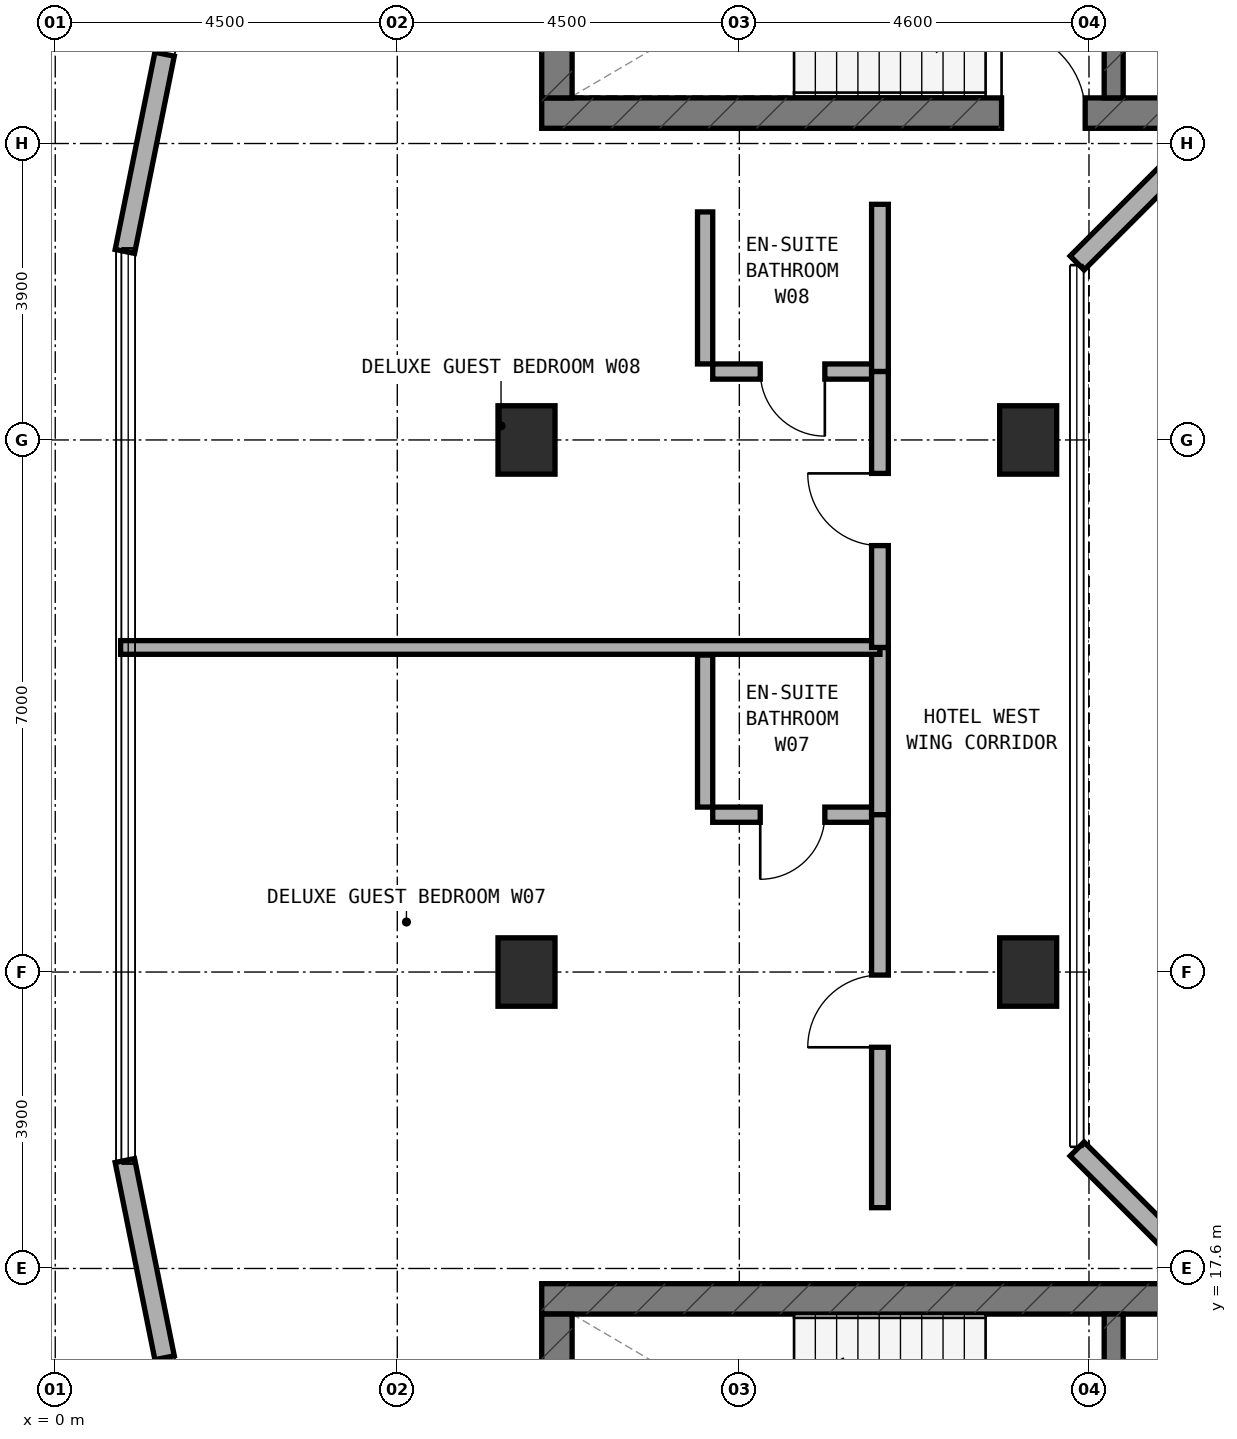
"""IFC4 building model, lengths in metres.
Left out: names, types, materials, properties, quantities, classifications, styles, units other than length and angle.
Written with IfcOpenShell. Run it as: python <this file> out.ifc"""

import sys

from ifc_helpers import new_model, si_unit, direction, frame, frame_2d, origin, origin_2d, place, context, subcontext, project, spatial, rectangle, extrude, element, fill, save


model = new_model("IFC4")
c1 = context("Model", 3, precision=1e-05, world=origin(), true_north=direction((0.0, 1.0)))
c2 = subcontext(c1, "Body", "Model", "MODEL_VIEW")
j1 = project(units=[si_unit("LENGTHUNIT", "METRE"), si_unit("PLANEANGLEUNIT", "RADIAN")], contexts=[c1])
p1 = place(None, origin())
s1 = spatial("IfcSite", under=j1, at=p1, CompositionType="ELEMENT")
p2 = place(p1, origin())
s2 = spatial("IfcBuilding", under=s1, at=p2, CompositionType="ELEMENT")
p3 = place(p2, frame((0.0, 0.0, 138.0)))
s3 = spatial("IfcBuildingStorey", under=s2, at=p3, CompositionType="ELEMENT", Elevation=138.0)
p4 = place(p3, frame((6.4, 32.8, 0.0), z_axis=(0.0, 0.0, 1.0), x_axis=(1.0, 0.0, 0.0)))
e1 = element("IfcWall", 1, at=p4, inside=s3, PredefinedType="SHEAR", context=c2, shape_type="SweptSolid", body=[
    extrude(rectangle(XDim=24.4, YDim=0.4, at=frame_2d((12.2, 0.0))), origin(), (0.0, 0.0, 1.0), 3.5),
])
p5 = place(p4, frame((6.05, 0.0, 0.0)))
e2 = element("IfcOpeningElement", 2, at=p5, cuts=e1, PredefinedType="OPENING", context=c2, shape_type="SweptSolid", body=[
    extrude(rectangle(XDim=1.1, YDim=2.15, at=frame_2d((0.55, 1.075))), frame((0.0, 0.21, 0.0), z_axis=(0.0, -1.0, 0.0), x_axis=(1.0, 0.0, 0.0)), (0.0, 0.0, 1.0), 0.42),
])
p6 = place(p3, frame((6.6, 33.0, 0.0), z_axis=(0.0, 0.0, 1.0), x_axis=(0.0, 1.0, 0.0)))
e3 = element("IfcWall", 3, at=p6, inside=s3, PredefinedType="SHEAR", context=c2, shape_type="SweptSolid", body=[
    extrude(rectangle(XDim=3.16, YDim=0.4, at=frame_2d((1.58, 0.0))), origin(), (0.0, 0.0, 1.0), 3.5),
])
p7 = place(p3, frame((13.925, 33.0, 0.0), z_axis=(0.0, 0.0, 1.0), x_axis=(0.0, 1.0, 0.0)))
e4 = element("IfcWall", 4, at=p7, inside=s3, PredefinedType="STANDARD", context=c2, shape_type="SweptSolid", body=[
    extrude(rectangle(XDim=3.16, YDim=0.25, at=frame_2d((1.58, 0.0))), origin(), (0.0, 0.0, 1.0), 3.22),
])
p8 = place(p7, frame((0.98, 0.0, 0.0)))
e5 = element("IfcOpeningElement", 5, at=p8, cuts=e4, PredefinedType="OPENING", context=c2, shape_type="SweptSolid", body=[
    extrude(rectangle(XDim=1.1, YDim=2.15, at=frame_2d((0.55, 1.075))), frame((0.0, 0.135, 0.0), z_axis=(0.0, -1.0, 0.0), x_axis=(1.0, 0.0, 0.0)), (0.0, 0.0, 1.0), 0.27),
])
p9 = place(p3, frame((6.4, 17.2, 0.0), z_axis=(0.0, 0.0, 1.0), x_axis=(1.0, 0.0, 0.0)))
e6 = element("IfcWall", 6, at=p9, inside=s3, PredefinedType="SHEAR", context=c2, shape_type="SweptSolid", body=[
    extrude(rectangle(XDim=24.4, YDim=0.4, at=frame_2d((12.2, 0.0))), origin(), (0.0, 0.0, 1.0), 3.5),
])
p10 = place(p3, frame((6.6, 13.84, 0.0), z_axis=(0.0, 0.0, 1.0), x_axis=(0.0, 1.0, 0.0)))
e7 = element("IfcWall", 7, at=p10, inside=s3, PredefinedType="SHEAR", context=c2, shape_type="SweptSolid", body=[
    extrude(rectangle(XDim=3.16, YDim=0.4, at=frame_2d((1.58, 0.0))), origin(), (0.0, 0.0, 1.0), 3.5),
])
p11 = place(p3, frame((13.925, 13.84, 0.0), z_axis=(0.0, 0.0, 1.0), x_axis=(0.0, 1.0, 0.0)))
e8 = element("IfcWall", 8, at=p11, inside=s3, PredefinedType="STANDARD", context=c2, shape_type="SweptSolid", body=[
    extrude(rectangle(XDim=3.16, YDim=0.25, at=frame_2d((1.58, 0.0))), origin(), (0.0, 0.0, 1.0), 3.22),
])
p12 = place(p11, frame((0.98, 0.0, 0.0)))
e9 = element("IfcOpeningElement", 9, at=p12, cuts=e8, PredefinedType="OPENING", context=c2, shape_type="SweptSolid", body=[
    extrude(rectangle(XDim=1.1, YDim=2.15, at=frame_2d((0.55, 1.075))), frame((0.0, 0.135, 0.0), z_axis=(0.0, -1.0, 0.0), x_axis=(1.0, 0.0, 0.0)), (0.0, 0.0, 1.0), 0.27),
])
for number, where, z_axis, x_axis in (
    (10, (6.2, 21.5, 0.0), (0.0, 0.0, 1.0), (1.0, 0.0, 0.0)),
    (11, (6.2, 28.5, 0.0), (0.0, 0.0, 1.0), (1.0, 0.0, 0.0)),
    (12, (12.8, 21.5, 0.0), (0.0, 0.0, 1.0), (1.0, 0.0, 0.0)),
    (13, (12.8, 28.5, 0.0), (0.0, 0.0, 1.0), (1.0, 0.0, 0.0)),
):
    element("IfcColumn", number, at=place(p3, frame(where, z_axis=z_axis, x_axis=x_axis)), inside=s3, PredefinedType="COLUMN", context=c2, shape_type="SweptSolid", body=[
        extrude(rectangle(XDim=0.75, YDim=0.9, at=origin_2d()), origin(), (0.0, 0.0, 1.0), 3.5),
    ])
p13 = place(p3, frame((2.729, 39.982, 0.0), z_axis=(0.0, 0.0, 1.0), x_axis=(-0.197435082048, -0.980315963543, 0.0)))
e14 = element("IfcWall", 14, at=p13, inside=s3, PredefinedType="STANDARD", context=c2, shape_type="SweptSolid", body=[
    extrude(rectangle(XDim=9.183, YDim=0.26, at=frame_2d((4.591, 0.0))), origin(), (0.0, 0.0, 1.0), 3.22),
])
p14 = place(p13, frame((4.436, 0.0, 0.85)))
e15 = element("IfcOpeningElement", 15, at=p14, cuts=e14, PredefinedType="OPENING", context=c2, shape_type="SweptSolid", body=[
    extrude(rectangle(XDim=2.1, YDim=1.5, at=frame_2d((1.05, 0.75))), frame((0.0, 0.14, 0.0), z_axis=(0.0, -1.0, 0.0), x_axis=(1.0, 0.0, 0.0)), (0.0, 0.0, 1.0), 0.28),
])
p15 = place(p3, frame((0.916, 19.02, 0.0), z_axis=(0.0, 0.0, 1.0), x_axis=(0.197435082048, -0.980315963543, 0.0)))
e16 = element("IfcWall", 16, at=p15, inside=s3, PredefinedType="STANDARD", context=c2, shape_type="SweptSolid", body=[
    extrude(rectangle(XDim=9.183, YDim=0.26, at=frame_2d((4.591, 0.0))), origin(), (0.0, 0.0, 1.0), 3.22),
])
p16 = place(p15, frame((2.647, 0.0, 0.85)))
e17 = element("IfcOpeningElement", 17, at=p16, cuts=e16, PredefinedType="OPENING", context=c2, shape_type="SweptSolid", body=[
    extrude(rectangle(XDim=2.1, YDim=1.5, at=frame_2d((1.05, 0.75))), frame((0.0, 0.14, 0.0), z_axis=(0.0, -1.0, 0.0), x_axis=(1.0, 0.0, 0.0)), (0.0, 0.0, 1.0), 0.28),
])
for number, where, z_axis, x_axis in (
    (18, (15.278, 32.662, 0.0), (0.0, 0.0, 1.0), (-0.707, -0.707, 0.0)),
    (19, (13.444, 19.172, 0.0), (0.0, 0.0, 1.0), (0.707, -0.707, 0.0)),
):
    element("IfcWall", number, at=place(p3, frame(where, z_axis=z_axis, x_axis=x_axis)), inside=s3, PredefinedType="STANDARD", context=c2, shape_type="SweptSolid", body=[
        extrude(rectangle(XDim=2.594, YDim=0.26, at=frame_2d((1.297, 0.0))), origin(), (0.0, 0.0, 1.0), 3.22),
    ])
p17 = place(p3, frame((8.65, 23.57, 0.0), z_axis=(0.0, 0.0, 1.0), x_axis=(1.0, 0.0, 0.0)))
e20 = element("IfcWall", 20, at=p17, inside=s3, PredefinedType="PLUMBINGWALL", context=c2, shape_type="SweptSolid", body=[
    extrude(rectangle(XDim=2.1, YDim=0.2, at=frame_2d((1.05, 0.0))), origin(), (0.0, 0.0, 1.0), 3.22),
])
p18 = place(p17, frame((0.625, 0.0, 0.0)))
e21 = element("IfcOpeningElement", 21, at=p18, cuts=e20, PredefinedType="OPENING", context=c2, shape_type="SweptSolid", body=[
    extrude(rectangle(XDim=0.85, YDim=2.1, at=frame_2d((0.425, 1.05))), frame((0.0, 0.11, 0.0), z_axis=(0.0, -1.0, 0.0), x_axis=(1.0, 0.0, 0.0)), (0.0, 0.0, 1.0), 0.22),
])
p19 = place(p3, frame((8.55, 23.67, 0.0), z_axis=(0.0, 0.0, 1.0), x_axis=(0.0, 1.0, 0.0)))
e22 = element("IfcWall", 22, at=p19, inside=s3, PredefinedType="PLUMBINGWALL", context=c2, shape_type="SweptSolid", body=[
    extrude(rectangle(XDim=2.0, YDim=0.2, at=frame_2d((1.0, 0.0))), origin(), (0.0, 0.0, 1.0), 3.22),
])
p20 = place(p3, frame((10.85, 23.57, 0.0), z_axis=(0.0, 0.0, 1.0), x_axis=(0.0, 1.0, 0.0)))
e23 = element("IfcWall", 23, at=p20, inside=s3, PredefinedType="SOLIDWALL", context=c2, shape_type="SweptSolid", body=[
    extrude(rectangle(XDim=2.2, YDim=0.22, at=frame_2d((1.1, 0.0))), origin(), (0.0, 0.0, 1.0), 3.22),
])
p21 = place(p3, frame((10.85, 18.4, 0.0), z_axis=(0.0, 0.0, 1.0), x_axis=(0.0, 1.0, 0.0)))
e24 = element("IfcWall", 24, at=p21, inside=s3, PredefinedType="SOLIDWALL", context=c2, shape_type="SweptSolid", body=[
    extrude(rectangle(XDim=5.17, YDim=0.22, at=frame_2d((2.585, 0.0))), origin(), (0.0, 0.0, 1.0), 2.695),
])
p22 = place(p21, frame((2.11, 0.0, 0.0)))
e25 = element("IfcOpeningElement", 25, at=p22, cuts=e24, PredefinedType="OPENING", context=c2, shape_type="SweptSolid", body=[
    extrude(rectangle(XDim=0.95, YDim=2.1, at=frame_2d((0.475, 1.05))), frame((0.0, 0.12, 0.0), z_axis=(0.0, -1.0, 0.0), x_axis=(1.0, 0.0, 0.0)), (0.0, 0.0, 1.0), 0.24),
])
p23 = place(p3, frame((0.86, 25.77, 0.0), z_axis=(0.0, 0.0, 1.0), x_axis=(1.0, 0.0, 0.0)))
e26 = element("IfcWall", 26, at=p23, inside=s3, PredefinedType="SOLIDWALL", context=c2, shape_type="SweptSolid", body=[
    extrude(rectangle(XDim=9.99, YDim=0.18, at=frame_2d((4.995, 0.0))), origin(), (0.0, 0.0, 1.0), 2.835),
])
p24 = place(p3, frame((8.65, 29.4, 0.0), z_axis=(0.0, 0.0, 1.0), x_axis=(1.0, 0.0, 0.0)))
e27 = element("IfcWall", 27, at=p24, inside=s3, PredefinedType="PLUMBINGWALL", context=c2, shape_type="SweptSolid", body=[
    extrude(rectangle(XDim=2.1, YDim=0.2, at=frame_2d((1.05, 0.0))), origin(), (0.0, 0.0, 1.0), 3.22),
])
p25 = place(p24, frame((0.625, 0.0, 0.0)))
e28 = element("IfcOpeningElement", 28, at=p25, cuts=e27, PredefinedType="OPENING", context=c2, shape_type="SweptSolid", body=[
    extrude(rectangle(XDim=0.85, YDim=2.1, at=frame_2d((0.425, 1.05))), frame((0.0, 0.11, 0.0), z_axis=(0.0, -1.0, 0.0), x_axis=(1.0, 0.0, 0.0)), (0.0, 0.0, 1.0), 0.22),
])
p26 = place(p3, frame((8.55, 29.5, 0.0), z_axis=(0.0, 0.0, 1.0), x_axis=(0.0, 1.0, 0.0)))
e29 = element("IfcWall", 29, at=p26, inside=s3, PredefinedType="PLUMBINGWALL", context=c2, shape_type="SweptSolid", body=[
    extrude(rectangle(XDim=2.0, YDim=0.2, at=frame_2d((1.0, 0.0))), origin(), (0.0, 0.0, 1.0), 3.22),
])
p27 = place(p3, frame((10.85, 29.4, 0.0), z_axis=(0.0, 0.0, 1.0), x_axis=(0.0, 1.0, 0.0)))
e30 = element("IfcWall", 30, at=p27, inside=s3, PredefinedType="SOLIDWALL", context=c2, shape_type="SweptSolid", body=[
    extrude(rectangle(XDim=2.2, YDim=0.22, at=frame_2d((1.1, 0.0))), origin(), (0.0, 0.0, 1.0), 3.22),
])
p28 = place(p3, frame((10.85, 25.77, 0.0), z_axis=(0.0, 0.0, 1.0), x_axis=(0.0, 1.0, 0.0)))
e31 = element("IfcWall", 31, at=p28, inside=s3, PredefinedType="SOLIDWALL", context=c2, shape_type="SweptSolid", body=[
    extrude(rectangle(XDim=3.63, YDim=0.22, at=frame_2d((1.815, 0.0))), origin(), (0.0, 0.0, 1.0), 2.695),
])
p29 = place(p28, frame((1.34, 0.0, 0.0)))
e32 = element("IfcOpeningElement", 32, at=p29, cuts=e31, PredefinedType="OPENING", context=c2, shape_type="SweptSolid", body=[
    extrude(rectangle(XDim=0.95, YDim=2.1, at=frame_2d((0.475, 1.05))), frame((0.0, 0.12, 0.0), z_axis=(0.0, -1.0, 0.0), x_axis=(1.0, 0.0, 0.0)), (0.0, 0.0, 1.0), 0.24),
])
p30 = place(p14, origin())
e33 = element("IfcWindow", 33, at=p30, inside=s3, PartitioningType="SINGLE_PANEL", PredefinedType="WINDOW", context=c2, shape_type="SweptSolid", body=[
    extrude(rectangle(XDim=2.1, YDim=1.5, at=frame_2d((1.05, 0.75))), frame((0.0, 0.03, 0.0), z_axis=(0.0, -1.0, 0.0), x_axis=(1.0, 0.0, 0.0)), (0.0, 0.0, 1.0), 0.06),
])
fill(e15, e33)
p31 = place(p16, origin())
e34 = element("IfcWindow", 34, at=p31, inside=s3, PartitioningType="SINGLE_PANEL", PredefinedType="WINDOW", context=c2, shape_type="SweptSolid", body=[
    extrude(rectangle(XDim=2.1, YDim=1.5, at=frame_2d((1.05, 0.75))), frame((0.0, 0.03, 0.0), z_axis=(0.0, -1.0, 0.0), x_axis=(1.0, 0.0, 0.0)), (0.0, 0.0, 1.0), 0.06),
])
fill(e17, e34)
p32 = place(p5, origin())
e35 = element("IfcDoor", 35, at=p32, inside=s3, OperationType="SINGLE_SWING_LEFT", PredefinedType="DOOR", context=c2, shape_type="SweptSolid", body=[
    extrude(rectangle(XDim=1.1, YDim=2.15, at=frame_2d((0.55, 1.075))), frame((0.0, 0.025, 0.0), z_axis=(0.0, -1.0, 0.0), x_axis=(1.0, 0.0, 0.0)), (0.0, 0.0, 1.0), 0.05),
])
fill(e2, e35)
p33 = place(p18, frame((0.85, 0.0, 0.0), z_axis=(0.0, 0.0, 1.0), x_axis=(-1.0, 0.0, 0.0)))
e36 = element("IfcDoor", 36, at=p33, inside=s3, OperationType="SINGLE_SWING_RIGHT", PredefinedType="DOOR", context=c2, shape_type="SweptSolid", body=[
    extrude(rectangle(XDim=0.85, YDim=2.1, at=frame_2d((0.425, 1.05))), frame((0.0, 0.025, 0.0), z_axis=(0.0, -1.0, 0.0), x_axis=(1.0, 0.0, 0.0)), (0.0, 0.0, 1.0), 0.05),
])
fill(e21, e36)
p34 = place(p22, origin())
e37 = element("IfcDoor", 37, at=p34, inside=s3, OperationType="SINGLE_SWING_LEFT", PredefinedType="DOOR", context=c2, shape_type="SweptSolid", body=[
    extrude(rectangle(XDim=0.95, YDim=2.1, at=frame_2d((0.475, 1.05))), frame((0.0, 0.025, 0.0), z_axis=(0.0, -1.0, 0.0), x_axis=(1.0, 0.0, 0.0)), (0.0, 0.0, 1.0), 0.05),
])
fill(e25, e37)
p35 = place(p25, frame((0.85, 0.0, 0.0), z_axis=(0.0, 0.0, 1.0), x_axis=(-1.0, 0.0, 0.0)))
e38 = element("IfcDoor", 38, at=p35, inside=s3, OperationType="SINGLE_SWING_LEFT", PredefinedType="DOOR", context=c2, shape_type="SweptSolid", body=[
    extrude(rectangle(XDim=0.85, YDim=2.1, at=frame_2d((0.425, 1.05))), frame((0.0, 0.025, 0.0), z_axis=(0.0, -1.0, 0.0), x_axis=(1.0, 0.0, 0.0)), (0.0, 0.0, 1.0), 0.05),
])
fill(e28, e38)
p36 = place(p29, origin())
e39 = element("IfcDoor", 39, at=p36, inside=s3, OperationType="SINGLE_SWING_RIGHT", PredefinedType="DOOR", context=c2, shape_type="SweptSolid", body=[
    extrude(rectangle(XDim=0.95, YDim=2.1, at=frame_2d((0.475, 1.05))), frame((0.0, 0.025, 0.0), z_axis=(0.0, -1.0, 0.0), x_axis=(1.0, 0.0, 0.0)), (0.0, 0.0, 1.0), 0.05),
])
fill(e32, e39)
save(model, sys.argv[1])
